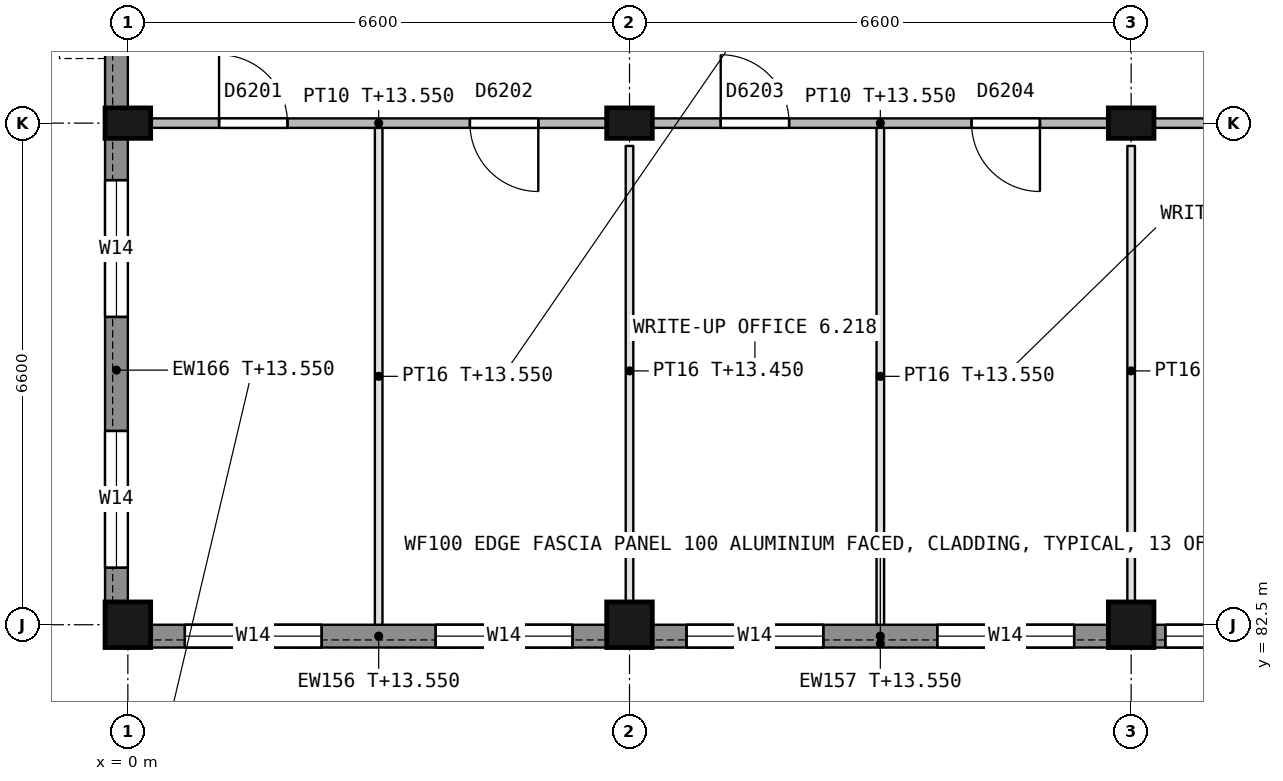
"""IFC4 building model, lengths in metres.
Left out: names, types, materials, properties, quantities, classifications, styles, units other than length and angle.
Written with IfcOpenShell. Run it as: python <this file> out.ifc"""

import sys

from ifc_helpers import new_model, si_unit, direction, frame, frame_2d, origin, origin_2d, place, context, subcontext, project, spatial, rectangle, extrude, element, fill, save


model = new_model("IFC4")
c1 = context("Model", 3, precision=1e-05, world=origin(), true_north=direction((0.0, 1.0)))
c2 = subcontext(c1, "Body", "Model", "MODEL_VIEW")
j1 = project(units=[si_unit("LENGTHUNIT", "METRE"), si_unit("PLANEANGLEUNIT", "RADIAN")], contexts=[c1])
p1 = place(None, origin())
s1 = spatial("IfcSite", under=j1, at=p1, CompositionType="ELEMENT")
p2 = place(p1, origin())
s2 = spatial("IfcBuilding", under=s1, at=p2, CompositionType="ELEMENT")
p3 = place(p2, frame((0.0, 0.0, 9.9)))
s3 = spatial("IfcBuildingStorey", under=s2, at=p3, CompositionType="ELEMENT", Elevation=9.9)
p4 = place(p3, frame((0.0, 82.5, 0.0), z_axis=(0.0, 0.0, 1.0), x_axis=(1.0, 0.0, 0.0)))
e1 = element("IfcColumn", 1, at=p4, inside=s3, PredefinedType="COLUMN", context=c2, shape_type="SweptSolid", body=[
    extrude(rectangle(XDim=0.6, YDim=0.6, at=origin_2d()), origin(), (0.0, 0.0, 1.0), 4.5),
])
p5 = place(p3, frame((0.0, 89.1, 0.0), z_axis=(0.0, 0.0, 1.0), x_axis=(1.0, 0.0, 0.0)))
e2 = element("IfcColumn", 2, at=p5, inside=s3, PredefinedType="COLUMN", context=c2, shape_type="SweptSolid", body=[
    extrude(rectangle(XDim=0.6, YDim=0.4, at=origin_2d()), origin(), (0.0, 0.0, 1.0), 4.5),
])
p6 = place(p3, frame((6.6, 82.5, 0.0), z_axis=(0.0, 0.0, 1.0), x_axis=(1.0, 0.0, 0.0)))
e3 = element("IfcColumn", 3, at=p6, inside=s3, PredefinedType="COLUMN", context=c2, shape_type="SweptSolid", body=[
    extrude(rectangle(XDim=0.6, YDim=0.6, at=origin_2d()), origin(), (0.0, 0.0, 1.0), 4.5),
])
p7 = place(p3, frame((6.6, 89.1, 0.0), z_axis=(0.0, 0.0, 1.0), x_axis=(1.0, 0.0, 0.0)))
e4 = element("IfcColumn", 4, at=p7, inside=s3, PredefinedType="COLUMN", context=c2, shape_type="SweptSolid", body=[
    extrude(rectangle(XDim=0.6, YDim=0.4, at=origin_2d()), origin(), (0.0, 0.0, 1.0), 4.5),
])
p8 = place(p3, frame((13.2, 82.5, 0.0), z_axis=(0.0, 0.0, 1.0), x_axis=(1.0, 0.0, 0.0)))
e5 = element("IfcColumn", 5, at=p8, inside=s3, PredefinedType="COLUMN", context=c2, shape_type="SweptSolid", body=[
    extrude(rectangle(XDim=0.6, YDim=0.6, at=origin_2d()), origin(), (0.0, 0.0, 1.0), 4.5),
])
p9 = place(p3, frame((13.2, 89.1, 0.0), z_axis=(0.0, 0.0, 1.0), x_axis=(1.0, 0.0, 0.0)))
e6 = element("IfcColumn", 6, at=p9, inside=s3, PredefinedType="COLUMN", context=c2, shape_type="SweptSolid", body=[
    extrude(rectangle(XDim=0.6, YDim=0.4, at=origin_2d()), origin(), (0.0, 0.0, 1.0), 4.5),
])
p10 = place(p3, frame((6.3, 82.35, 0.0), z_axis=(0.0, 0.0, 1.0), x_axis=(-1.0, 0.0, 0.0)))
e7 = element("IfcWall", 7, at=p10, inside=s3, PredefinedType="STANDARD", context=c2, shape_type="SweptSolid", body=[
    extrude(rectangle(XDim=6.0, YDim=0.3, at=frame_2d((3.0, 0.0))), origin(), (0.0, 0.0, 1.0), 3.65),
])
p11 = place(p10, frame((3.75, 0.0, 0.9)))
e8 = element("IfcOpeningElement", 8, at=p11, cuts=e7, PredefinedType="OPENING", context=c2, shape_type="SweptSolid", body=[
    extrude(rectangle(XDim=1.8, YDim=1.5, at=frame_2d((0.9, 0.75))), frame((0.0, 0.16, 0.0), z_axis=(0.0, -1.0, 0.0), x_axis=(1.0, 0.0, 0.0)), (0.0, 0.0, 1.0), 0.32),
])
p12 = place(p10, frame((0.45, 0.0, 0.9)))
e9 = element("IfcOpeningElement", 9, at=p12, cuts=e7, PredefinedType="OPENING", context=c2, shape_type="SweptSolid", body=[
    extrude(rectangle(XDim=1.8, YDim=1.5, at=frame_2d((0.9, 0.75))), frame((0.0, 0.16, 0.0), z_axis=(0.0, -1.0, 0.0), x_axis=(1.0, 0.0, 0.0)), (0.0, 0.0, 1.0), 0.32),
])
p13 = place(p3, frame((12.9, 82.35, 0.0), z_axis=(0.0, 0.0, 1.0), x_axis=(-1.0, 0.0, 0.0)))
e10 = element("IfcWall", 10, at=p13, inside=s3, PredefinedType="STANDARD", context=c2, shape_type="SweptSolid", body=[
    extrude(rectangle(XDim=6.0, YDim=0.3, at=frame_2d((3.0, 0.0))), origin(), (0.0, 0.0, 1.0), 3.65),
])
p14 = place(p13, frame((3.75, 0.0, 0.9)))
e11 = element("IfcOpeningElement", 11, at=p14, cuts=e10, PredefinedType="OPENING", context=c2, shape_type="SweptSolid", body=[
    extrude(rectangle(XDim=1.8, YDim=1.5, at=frame_2d((0.9, 0.75))), frame((0.0, 0.16, 0.0), z_axis=(0.0, -1.0, 0.0), x_axis=(1.0, 0.0, 0.0)), (0.0, 0.0, 1.0), 0.32),
])
p15 = place(p13, frame((0.45, 0.0, 0.9)))
e12 = element("IfcOpeningElement", 12, at=p15, cuts=e10, PredefinedType="OPENING", context=c2, shape_type="SweptSolid", body=[
    extrude(rectangle(XDim=1.8, YDim=1.5, at=frame_2d((0.9, 0.75))), frame((0.0, 0.16, 0.0), z_axis=(0.0, -1.0, 0.0), x_axis=(1.0, 0.0, 0.0)), (0.0, 0.0, 1.0), 0.32),
])
p16 = place(p3, frame((19.5, 82.35, 0.0), z_axis=(0.0, 0.0, 1.0), x_axis=(-1.0, 0.0, 0.0)))
e13 = element("IfcWall", 13, at=p16, inside=s3, PredefinedType="STANDARD", context=c2, shape_type="SweptSolid", body=[
    extrude(rectangle(XDim=6.0, YDim=0.3, at=frame_2d((3.0, 0.0))), origin(), (0.0, 0.0, 1.0), 3.65),
])
p17 = place(p16, frame((3.45, 0.0, 0.9)))
e14 = element("IfcOpeningElement", 14, at=p17, cuts=e13, PredefinedType="OPENING", context=c2, shape_type="SweptSolid", body=[
    extrude(rectangle(XDim=2.4, YDim=1.8, at=frame_2d((1.2, 0.9))), frame((0.0, 0.16, 0.0), z_axis=(0.0, -1.0, 0.0), x_axis=(1.0, 0.0, 0.0)), (0.0, 0.0, 1.0), 0.32),
])
p18 = place(p16, frame((0.15, 0.0, 0.9)))
e15 = element("IfcOpeningElement", 15, at=p18, cuts=e13, PredefinedType="OPENING", context=c2, shape_type="SweptSolid", body=[
    extrude(rectangle(XDim=2.4, YDim=1.8, at=frame_2d((1.2, 0.9))), frame((0.0, 0.16, 0.0), z_axis=(0.0, -1.0, 0.0), x_axis=(1.0, 0.0, 0.0)), (0.0, 0.0, 1.0), 0.32),
])
p19 = place(p3, frame((-0.15, 82.8, 0.0), z_axis=(0.0, 0.0, 1.0), x_axis=(0.0, 1.0, 0.0)))
e16 = element("IfcWall", 16, at=p19, inside=s3, PredefinedType="STANDARD", context=c2, shape_type="SweptSolid", body=[
    extrude(rectangle(XDim=6.1, YDim=0.3, at=frame_2d((3.05, 0.0))), origin(), (0.0, 0.0, 1.0), 3.65),
])
p20 = place(p19, frame((0.45, 0.0, 0.9)))
e17 = element("IfcOpeningElement", 17, at=p20, cuts=e16, PredefinedType="OPENING", context=c2, shape_type="SweptSolid", body=[
    extrude(rectangle(XDim=1.8, YDim=1.5, at=frame_2d((0.9, 0.75))), frame((0.0, 0.16, 0.0), z_axis=(0.0, -1.0, 0.0), x_axis=(1.0, 0.0, 0.0)), (0.0, 0.0, 1.0), 0.32),
])
p21 = place(p19, frame((3.75, 0.0, 0.9)))
e18 = element("IfcOpeningElement", 18, at=p21, cuts=e16, PredefinedType="OPENING", context=c2, shape_type="SweptSolid", body=[
    extrude(rectangle(XDim=1.8, YDim=1.5, at=frame_2d((0.9, 0.75))), frame((0.0, 0.16, 0.0), z_axis=(0.0, -1.0, 0.0), x_axis=(1.0, 0.0, 0.0)), (0.0, 0.0, 1.0), 0.32),
])
p22 = place(p3, frame((-0.15, 89.3, 0.0), z_axis=(0.0, 0.0, 1.0), x_axis=(0.0, 1.0, 0.0)))
e19 = element("IfcWall", 19, at=p22, inside=s3, PredefinedType="STANDARD", context=c2, shape_type="SweptSolid", body=[
    extrude(rectangle(XDim=3.1, YDim=0.3, at=frame_2d((1.55, 0.0))), origin(), (0.0, 0.0, 1.0), 3.65),
])
p23 = place(p22, frame((0.85, 0.0, 1.1)))
e20 = element("IfcOpeningElement", 20, at=p23, cuts=e19, PredefinedType="OPENING", context=c2, shape_type="SweptSolid", body=[
    extrude(rectangle(XDim=1.2, YDim=1.2, at=frame_2d((0.6, 0.6))), frame((0.0, 0.16, 0.0), z_axis=(0.0, -1.0, 0.0), x_axis=(1.0, 0.0, 0.0)), (0.0, 0.0, 1.0), 0.32),
])
p24 = place(p3, frame((6.3, 89.1, 0.0), z_axis=(0.0, 0.0, 1.0), x_axis=(-1.0, 0.0, 0.0)))
e21 = element("IfcWall", 21, at=p24, inside=s3, PredefinedType="PARTITIONING", context=c2, shape_type="SweptSolid", body=[
    extrude(rectangle(XDim=6.0, YDim=0.125, at=frame_2d((3.0, 0.0))), origin(), (0.0, 0.0, 1.0), 3.65),
])
p25 = place(p24, frame((4.2, 0.0, 0.0)))
e22 = element("IfcOpeningElement", 22, at=p25, cuts=e21, PredefinedType="OPENING", context=c2, shape_type="SweptSolid", body=[
    extrude(rectangle(XDim=0.9, YDim=2.1, at=frame_2d((0.45, 1.05))), frame((0.0, 0.073, 0.0), z_axis=(0.0, -1.0, 0.0), x_axis=(1.0, 0.0, 0.0)), (0.0, 0.0, 1.0), 0.145),
])
p26 = place(p24, frame((0.9, 0.0, 0.0)))
e23 = element("IfcOpeningElement", 23, at=p26, cuts=e21, PredefinedType="OPENING", context=c2, shape_type="SweptSolid", body=[
    extrude(rectangle(XDim=0.9, YDim=2.1, at=frame_2d((0.45, 1.05))), frame((0.0, 0.073, 0.0), z_axis=(0.0, -1.0, 0.0), x_axis=(1.0, 0.0, 0.0)), (0.0, 0.0, 1.0), 0.145),
])
p27 = place(p3, frame((12.9, 89.1, 0.0), z_axis=(0.0, 0.0, 1.0), x_axis=(-1.0, 0.0, 0.0)))
e24 = element("IfcWall", 24, at=p27, inside=s3, PredefinedType="PARTITIONING", context=c2, shape_type="SweptSolid", body=[
    extrude(rectangle(XDim=6.0, YDim=0.125, at=frame_2d((3.0, 0.0))), origin(), (0.0, 0.0, 1.0), 3.65),
])
p28 = place(p27, frame((4.2, 0.0, 0.0)))
e25 = element("IfcOpeningElement", 25, at=p28, cuts=e24, PredefinedType="OPENING", context=c2, shape_type="SweptSolid", body=[
    extrude(rectangle(XDim=0.9, YDim=2.1, at=frame_2d((0.45, 1.05))), frame((0.0, 0.073, 0.0), z_axis=(0.0, -1.0, 0.0), x_axis=(1.0, 0.0, 0.0)), (0.0, 0.0, 1.0), 0.145),
])
p29 = place(p27, frame((0.9, 0.0, 0.0)))
e26 = element("IfcOpeningElement", 26, at=p29, cuts=e24, PredefinedType="OPENING", context=c2, shape_type="SweptSolid", body=[
    extrude(rectangle(XDim=0.9, YDim=2.1, at=frame_2d((0.45, 1.05))), frame((0.0, 0.073, 0.0), z_axis=(0.0, -1.0, 0.0), x_axis=(1.0, 0.0, 0.0)), (0.0, 0.0, 1.0), 0.145),
])
p30 = place(p3, frame((13.5, 89.1, 0.0), z_axis=(0.0, 0.0, 1.0), x_axis=(1.0, 0.0, 0.0)))
e27 = element("IfcWall", 27, at=p30, inside=s3, PredefinedType="PARTITIONING", context=c2, shape_type="SweptSolid", body=[
    extrude(rectangle(XDim=6.0, YDim=0.125, at=frame_2d((3.0, 0.0))), origin(), (0.0, 0.0, 1.0), 3.65),
])
p31 = place(p30, frame((4.1, 0.0, 0.0)))
e28 = element("IfcOpeningElement", 28, at=p31, cuts=e27, PredefinedType="OPENING", context=c2, shape_type="SweptSolid", body=[
    extrude(rectangle(XDim=1.8, YDim=2.1, at=frame_2d((0.9, 1.05))), frame((0.0, 0.073, 0.0), z_axis=(0.0, -1.0, 0.0), x_axis=(1.0, 0.0, 0.0)), (0.0, 0.0, 1.0), 0.145),
])
p32 = place(p3, frame((3.3, 82.5, 0.0), z_axis=(0.0, 0.0, 1.0), x_axis=(0.0, 1.0, 0.0)))
e29 = element("IfcWall", 29, at=p32, inside=s3, PredefinedType="PARTITIONING", context=c2, shape_type="SweptSolid", body=[
    extrude(rectangle(XDim=6.537, YDim=0.1, at=frame_2d((3.269, 0.0))), origin(), (0.0, 0.0, 1.0), 3.65),
])
p33 = place(p3, frame((6.6, 82.8, 0.0), z_axis=(0.0, 0.0, 1.0), x_axis=(0.0, 1.0, 0.0)))
e30 = element("IfcWall", 30, at=p33, inside=s3, PredefinedType="PARTITIONING", context=c2, shape_type="SweptSolid", body=[
    extrude(rectangle(XDim=6.0, YDim=0.1, at=frame_2d((3.0, 0.0))), origin(), (0.0, 0.0, 1.0), 3.55),
])
p34 = place(p3, frame((9.9, 82.5, 0.0), z_axis=(0.0, 0.0, 1.0), x_axis=(0.0, 1.0, 0.0)))
e31 = element("IfcWall", 31, at=p34, inside=s3, PredefinedType="PARTITIONING", context=c2, shape_type="SweptSolid", body=[
    extrude(rectangle(XDim=6.537, YDim=0.1, at=frame_2d((3.269, 0.0))), origin(), (0.0, 0.0, 1.0), 3.65),
])
p35 = place(p3, frame((13.2, 82.8, 0.0), z_axis=(0.0, 0.0, 1.0), x_axis=(0.0, 1.0, 0.0)))
e32 = element("IfcWall", 32, at=p35, inside=s3, PredefinedType="PARTITIONING", context=c2, shape_type="SweptSolid", body=[
    extrude(rectangle(XDim=6.0, YDim=0.1, at=frame_2d((3.0, 0.0))), origin(), (0.0, 0.0, 1.0), 3.55),
])
p36 = place(p11, origin())
e33 = element("IfcWindow", 33, at=p36, inside=s3, PartitioningType="SINGLE_PANEL", PredefinedType="WINDOW", context=c2, shape_type="SweptSolid", body=[
    extrude(rectangle(XDim=1.8, YDim=1.5, at=frame_2d((0.9, 0.75))), frame((0.0, 0.03, 0.0), z_axis=(0.0, -1.0, 0.0), x_axis=(1.0, 0.0, 0.0)), (0.0, 0.0, 1.0), 0.06),
])
fill(e8, e33)
p37 = place(p12, origin())
e34 = element("IfcWindow", 34, at=p37, inside=s3, PartitioningType="SINGLE_PANEL", PredefinedType="WINDOW", context=c2, shape_type="SweptSolid", body=[
    extrude(rectangle(XDim=1.8, YDim=1.5, at=frame_2d((0.9, 0.75))), frame((0.0, 0.03, 0.0), z_axis=(0.0, -1.0, 0.0), x_axis=(1.0, 0.0, 0.0)), (0.0, 0.0, 1.0), 0.06),
])
fill(e9, e34)
p38 = place(p14, origin())
e35 = element("IfcWindow", 35, at=p38, inside=s3, PartitioningType="SINGLE_PANEL", PredefinedType="WINDOW", context=c2, shape_type="SweptSolid", body=[
    extrude(rectangle(XDim=1.8, YDim=1.5, at=frame_2d((0.9, 0.75))), frame((0.0, 0.03, 0.0), z_axis=(0.0, -1.0, 0.0), x_axis=(1.0, 0.0, 0.0)), (0.0, 0.0, 1.0), 0.06),
])
fill(e11, e35)
p39 = place(p15, origin())
e36 = element("IfcWindow", 36, at=p39, inside=s3, PartitioningType="SINGLE_PANEL", PredefinedType="WINDOW", context=c2, shape_type="SweptSolid", body=[
    extrude(rectangle(XDim=1.8, YDim=1.5, at=frame_2d((0.9, 0.75))), frame((0.0, 0.03, 0.0), z_axis=(0.0, -1.0, 0.0), x_axis=(1.0, 0.0, 0.0)), (0.0, 0.0, 1.0), 0.06),
])
fill(e12, e36)
p40 = place(p17, origin())
e37 = element("IfcWindow", 37, at=p40, inside=s3, PartitioningType="SINGLE_PANEL", PredefinedType="WINDOW", context=c2, shape_type="SweptSolid", body=[
    extrude(rectangle(XDim=2.4, YDim=1.8, at=frame_2d((1.2, 0.9))), frame((0.0, 0.03, 0.0), z_axis=(0.0, -1.0, 0.0), x_axis=(1.0, 0.0, 0.0)), (0.0, 0.0, 1.0), 0.06),
])
fill(e14, e37)
p41 = place(p20, origin())
e38 = element("IfcWindow", 38, at=p41, inside=s3, PartitioningType="SINGLE_PANEL", PredefinedType="WINDOW", context=c2, shape_type="SweptSolid", body=[
    extrude(rectangle(XDim=1.8, YDim=1.5, at=frame_2d((0.9, 0.75))), frame((0.0, 0.03, 0.0), z_axis=(0.0, -1.0, 0.0), x_axis=(1.0, 0.0, 0.0)), (0.0, 0.0, 1.0), 0.06),
])
fill(e17, e38)
p42 = place(p21, origin())
e39 = element("IfcWindow", 39, at=p42, inside=s3, PartitioningType="SINGLE_PANEL", PredefinedType="WINDOW", context=c2, shape_type="SweptSolid", body=[
    extrude(rectangle(XDim=1.8, YDim=1.5, at=frame_2d((0.9, 0.75))), frame((0.0, 0.03, 0.0), z_axis=(0.0, -1.0, 0.0), x_axis=(1.0, 0.0, 0.0)), (0.0, 0.0, 1.0), 0.06),
])
fill(e18, e39)
p43 = place(p25, origin())
e40 = element("IfcDoor", 40, at=p43, inside=s3, OperationType="SINGLE_SWING_RIGHT", PredefinedType="DOOR", context=c2, shape_type="SweptSolid", body=[
    extrude(rectangle(XDim=0.9, YDim=2.1, at=frame_2d((0.45, 1.05))), frame((0.0, 0.025, 0.0), z_axis=(0.0, -1.0, 0.0), x_axis=(1.0, 0.0, 0.0)), (0.0, 0.0, 1.0), 0.05),
])
fill(e22, e40)
p44 = place(p26, origin())
e41 = element("IfcDoor", 41, at=p44, inside=s3, OperationType="SINGLE_SWING_LEFT", PredefinedType="DOOR", context=c2, shape_type="SweptSolid", body=[
    extrude(rectangle(XDim=0.9, YDim=2.1, at=frame_2d((0.45, 1.05))), frame((0.0, 0.025, 0.0), z_axis=(0.0, -1.0, 0.0), x_axis=(1.0, 0.0, 0.0)), (0.0, 0.0, 1.0), 0.05),
])
fill(e23, e41)
p45 = place(p28, origin())
e42 = element("IfcDoor", 42, at=p45, inside=s3, OperationType="SINGLE_SWING_RIGHT", PredefinedType="DOOR", context=c2, shape_type="SweptSolid", body=[
    extrude(rectangle(XDim=0.9, YDim=2.1, at=frame_2d((0.45, 1.05))), frame((0.0, 0.025, 0.0), z_axis=(0.0, -1.0, 0.0), x_axis=(1.0, 0.0, 0.0)), (0.0, 0.0, 1.0), 0.05),
])
fill(e25, e42)
p46 = place(p29, origin())
e43 = element("IfcDoor", 43, at=p46, inside=s3, OperationType="SINGLE_SWING_LEFT", PredefinedType="DOOR", context=c2, shape_type="SweptSolid", body=[
    extrude(rectangle(XDim=0.9, YDim=2.1, at=frame_2d((0.45, 1.05))), frame((0.0, 0.025, 0.0), z_axis=(0.0, -1.0, 0.0), x_axis=(1.0, 0.0, 0.0)), (0.0, 0.0, 1.0), 0.05),
])
fill(e26, e43)
save(model, sys.argv[1])
